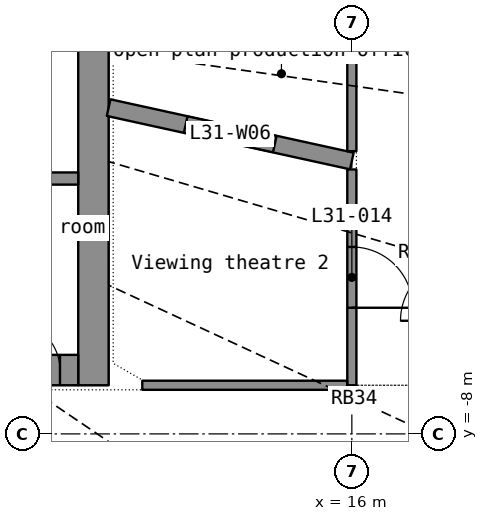
"""IFC4 building model, lengths in metres.
Left out: names, types, materials, properties, quantities, classifications, styles, units other than length and angle.
Written with IfcOpenShell. Run it as: python <this file> out.ifc"""

import sys

from ifc_helpers import new_model, si_unit, direction, frame, frame_2d, origin, place, context, subcontext, project, spatial, rectangle, extrude, element, fill, save


model = new_model("IFC4")
c1 = context("Model", 3, precision=1e-05, world=origin(), true_north=direction((0.0, 1.0)))
c2 = subcontext(c1, "Body", "Model", "MODEL_VIEW")
j1 = project(units=[si_unit("LENGTHUNIT", "METRE"), si_unit("PLANEANGLEUNIT", "RADIAN")], contexts=[c1])
p1 = place(None, origin())
s1 = spatial("IfcSite", under=j1, at=p1, CompositionType="ELEMENT")
p2 = place(p1, origin())
s2 = spatial("IfcBuilding", under=s1, at=p2, CompositionType="ELEMENT")
p3 = place(p2, frame((0.0, 0.0, 130.4)))
s3 = spatial("IfcBuildingStorey", under=s2, at=p3, CompositionType="ELEMENT", Elevation=130.4)
p4 = place(p3, frame((11.75, -7.2, 0.0), z_axis=(0.0, 0.0, 1.0), x_axis=(0.0, 1.0, 0.0)))
e1 = element("IfcWall", 1, at=p4, inside=s3, PredefinedType="SHEAR", context=c2, shape_type="SweptSolid", body=[
    extrude(rectangle(XDim=14.4, YDim=0.5, at=frame_2d((7.2, 0.0))), origin(), (0.0, 0.0, 1.0), 3.3),
])
p5 = place(p4, frame((6.5, 0.0, 0.0)))
e2 = element("IfcOpeningElement", 2, at=p5, cuts=e1, PredefinedType="OPENING", context=c2, shape_type="SweptSolid", body=[
    extrude(rectangle(XDim=1.4, YDim=2.2, at=frame_2d((0.7, 1.1))), frame((0.0, 0.26, 0.0), z_axis=(0.0, -1.0, 0.0), x_axis=(1.0, 0.0, 0.0)), (0.0, 0.0, 1.0), 0.52),
])
p6 = place(p3, frame((-11.5, -6.95, 0.0), z_axis=(0.0, 0.0, 1.0), x_axis=(1.0, 0.0, 0.0)))
e3 = element("IfcWall", 3, at=p6, inside=s3, PredefinedType="SHEAR", context=c2, shape_type="SweptSolid", body=[
    extrude(rectangle(XDim=23.0, YDim=0.5, at=frame_2d((11.5, 0.0))), origin(), (0.0, 0.0, 1.0), 3.3),
])
p7 = place(p6, frame((1.95, 0.0, 0.0)))
e4 = element("IfcOpeningElement", 4, at=p7, cuts=e3, PredefinedType="OPENING", context=c2, shape_type="SweptSolid", body=[
    extrude(rectangle(XDim=1.1, YDim=2.2, at=frame_2d((0.55, 1.1))), frame((0.0, 0.26, 0.0), z_axis=(0.0, -1.0, 0.0), x_axis=(1.0, 0.0, 0.0)), (0.0, 0.0, 1.0), 0.52),
])
p8 = place(p6, frame((3.95, 0.0, 0.0)))
e5 = element("IfcOpeningElement", 5, at=p8, cuts=e3, PredefinedType="OPENING", context=c2, shape_type="SweptSolid", body=[
    extrude(rectangle(XDim=1.1, YDim=2.2, at=frame_2d((0.55, 1.1))), frame((0.0, 0.26, 0.0), z_axis=(0.0, -1.0, 0.0), x_axis=(1.0, 0.0, 0.0)), (0.0, 0.0, 1.0), 0.52),
])
p9 = place(p6, frame((5.95, 0.0, 0.0)))
e6 = element("IfcOpeningElement", 6, at=p9, cuts=e3, PredefinedType="OPENING", context=c2, shape_type="SweptSolid", body=[
    extrude(rectangle(XDim=1.1, YDim=2.2, at=frame_2d((0.55, 1.1))), frame((0.0, 0.26, 0.0), z_axis=(0.0, -1.0, 0.0), x_axis=(1.0, 0.0, 0.0)), (0.0, 0.0, 1.0), 0.52),
])
p10 = place(p6, frame((7.95, 0.0, 0.0)))
e7 = element("IfcOpeningElement", 7, at=p10, cuts=e3, PredefinedType="OPENING", context=c2, shape_type="SweptSolid", body=[
    extrude(rectangle(XDim=1.1, YDim=2.2, at=frame_2d((0.55, 1.1))), frame((0.0, 0.26, 0.0), z_axis=(0.0, -1.0, 0.0), x_axis=(1.0, 0.0, 0.0)), (0.0, 0.0, 1.0), 0.52),
])
p11 = place(p6, frame((9.95, 0.0, 0.0)))
e8 = element("IfcOpeningElement", 8, at=p11, cuts=e3, PredefinedType="OPENING", context=c2, shape_type="SweptSolid", body=[
    extrude(rectangle(XDim=1.1, YDim=2.2, at=frame_2d((0.55, 1.1))), frame((0.0, 0.26, 0.0), z_axis=(0.0, -1.0, 0.0), x_axis=(1.0, 0.0, 0.0)), (0.0, 0.0, 1.0), 0.52),
])
p12 = place(p6, frame((11.95, 0.0, 0.0)))
e9 = element("IfcOpeningElement", 9, at=p12, cuts=e3, PredefinedType="OPENING", context=c2, shape_type="SweptSolid", body=[
    extrude(rectangle(XDim=1.1, YDim=2.2, at=frame_2d((0.55, 1.1))), frame((0.0, 0.26, 0.0), z_axis=(0.0, -1.0, 0.0), x_axis=(1.0, 0.0, 0.0)), (0.0, 0.0, 1.0), 0.52),
])
p13 = place(p6, frame((13.95, 0.0, 0.0)))
e10 = element("IfcOpeningElement", 10, at=p13, cuts=e3, PredefinedType="OPENING", context=c2, shape_type="SweptSolid", body=[
    extrude(rectangle(XDim=1.1, YDim=2.2, at=frame_2d((0.55, 1.1))), frame((0.0, 0.26, 0.0), z_axis=(0.0, -1.0, 0.0), x_axis=(1.0, 0.0, 0.0)), (0.0, 0.0, 1.0), 0.52),
])
p14 = place(p6, frame((15.95, 0.0, 0.0)))
e11 = element("IfcOpeningElement", 11, at=p14, cuts=e3, PredefinedType="OPENING", context=c2, shape_type="SweptSolid", body=[
    extrude(rectangle(XDim=1.1, YDim=2.2, at=frame_2d((0.55, 1.1))), frame((0.0, 0.26, 0.0), z_axis=(0.0, -1.0, 0.0), x_axis=(1.0, 0.0, 0.0)), (0.0, 0.0, 1.0), 0.52),
])
p15 = place(p6, frame((19.95, 0.0, 0.0)))
e12 = element("IfcOpeningElement", 12, at=p15, cuts=e3, PredefinedType="OPENING", context=c2, shape_type="SweptSolid", body=[
    extrude(rectangle(XDim=1.1, YDim=2.2, at=frame_2d((0.55, 1.1))), frame((0.0, 0.26, 0.0), z_axis=(0.0, -1.0, 0.0), x_axis=(1.0, 0.0, 0.0)), (0.0, 0.0, 1.0), 0.52),
])
p16 = place(p6, frame((0.3, 0.0, 0.0)))
e13 = element("IfcOpeningElement", 13, at=p16, cuts=e3, PredefinedType="OPENING", context=c2, shape_type="SweptSolid", body=[
    extrude(rectangle(XDim=0.8, YDim=2.05, at=frame_2d((0.4, 1.025))), frame((0.0, 0.26, 0.0), z_axis=(0.0, -1.0, 0.0), x_axis=(1.0, 0.0, 0.0)), (0.0, 0.0, 1.0), 0.52),
])
p17 = place(p6, frame((21.9, 0.0, 0.0)))
e14 = element("IfcOpeningElement", 14, at=p17, cuts=e3, PredefinedType="OPENING", context=c2, shape_type="SweptSolid", body=[
    extrude(rectangle(XDim=0.8, YDim=2.05, at=frame_2d((0.4, 1.025))), frame((0.0, 0.26, 0.0), z_axis=(0.0, -1.0, 0.0), x_axis=(1.0, 0.0, 0.0)), (0.0, 0.0, 1.0), 0.52),
])
p18 = place(p3, frame((-11.5, -3.8, 0.0), z_axis=(0.0, 0.0, 1.0), x_axis=(1.0, 0.0, 0.0)))
e15 = element("IfcWall", 15, at=p18, inside=s3, PredefinedType="SHEAR", context=c2, shape_type="SweptSolid", body=[
    extrude(rectangle(XDim=23.0, YDim=0.2, at=frame_2d((11.5, 0.0))), origin(), (0.0, 0.0, 1.0), 3.3),
])
p19 = place(p3, frame((16.0, -3.512, 0.0), z_axis=(0.0, 0.0, 1.0), x_axis=(-0.976750433, 0.214379551, 0.0)))
e16 = element("IfcWall", 16, at=p19, inside=s3, PredefinedType="PARTITIONING", context=c2, shape_type="SweptSolid", body=[
    extrude(rectangle(XDim=4.095, YDim=0.28, at=frame_2d((2.048, 0.0))), origin(), (0.0, 0.0, 1.0), 2.4),
])
p20 = place(p19, frame((1.298, 0.0, 1.0)))
e17 = element("IfcOpeningElement", 17, at=p20, cuts=e16, PredefinedType="OPENING", context=c2, shape_type="SweptSolid", body=[
    extrude(rectangle(XDim=1.5, YDim=1.2, at=frame_2d((0.75, 0.6))), frame((0.0, 0.15, 0.0), z_axis=(0.0, -1.0, 0.0), x_axis=(1.0, 0.0, 0.0)), (0.0, 0.0, 1.0), 0.3),
])
p21 = place(p3, frame((16.0, -3.65, 0.0), z_axis=(0.0, 0.0, 1.0), x_axis=(0.0, -1.0, 0.0)))
e18 = element("IfcWall", 18, at=p21, inside=s3, PredefinedType="PARTITIONING", context=c2, shape_type="SweptSolid", body=[
    extrude(rectangle(XDim=3.55, YDim=0.15, at=frame_2d((1.775, 0.0))), origin(), (0.0, 0.0, 1.0), 2.4),
])
p22 = place(p21, frame((1.275, 0.0, 0.0)))
e19 = element("IfcOpeningElement", 19, at=p22, cuts=e18, PredefinedType="OPENING", context=c2, shape_type="SweptSolid", body=[
    extrude(rectangle(XDim=1.0, YDim=2.2, at=frame_2d((0.5, 1.1))), frame((0.0, 0.085, 0.0), z_axis=(0.0, -1.0, 0.0), x_axis=(1.0, 0.0, 0.0)), (0.0, 0.0, 1.0), 0.17),
])
p23 = place(p3, frame((15.923, -7.2, 0.0), z_axis=(0.0, 0.0, 1.0), x_axis=(-1.0, 0.0, 0.0)))
e20 = element("IfcWall", 20, at=p23, inside=s3, PredefinedType="PARTITIONING", context=c2, shape_type="SweptSolid", body=[
    extrude(rectangle(XDim=3.37, YDim=0.15, at=frame_2d((1.685, 0.0))), origin(), (0.0, 0.0, 1.0), 2.4),
])
p24 = place(p3, frame((16.0, -0.977, 0.0), z_axis=(0.0, 0.0, 1.0), x_axis=(0.0, -1.0, 0.0)))
e21 = element("IfcWall", 21, at=p24, inside=s3, PredefinedType="PARTITIONING", context=c2, shape_type="SweptSolid", body=[
    extrude(rectangle(XDim=2.373, YDim=0.15, at=frame_2d((1.187, 0.0))), origin(), (0.0, 0.0, 1.0), 2.4),
])
p25 = place(p17, origin())
e22 = element("IfcDoor", 22, at=p25, inside=s3, OperationType="SINGLE_SWING_LEFT", PredefinedType="DOOR", context=c2, shape_type="SweptSolid", body=[
    extrude(rectangle(XDim=0.8, YDim=2.05, at=frame_2d((0.4, 1.025))), frame((0.0, 0.025, 0.0), z_axis=(0.0, -1.0, 0.0), x_axis=(1.0, 0.0, 0.0)), (0.0, 0.0, 1.0), 0.05),
])
fill(e14, e22)
p26 = place(p22, origin())
e23 = element("IfcDoor", 23, at=p26, inside=s3, OperationType="SINGLE_SWING_RIGHT", PredefinedType="DOOR", context=c2, shape_type="SweptSolid", body=[
    extrude(rectangle(XDim=1.0, YDim=2.2, at=frame_2d((0.5, 1.1))), frame((0.0, 0.025, 0.0), z_axis=(0.0, -1.0, 0.0), x_axis=(1.0, 0.0, 0.0)), (0.0, 0.0, 1.0), 0.05),
])
fill(e19, e23)
p27 = place(p20, origin())
e24 = element("IfcWindow", 24, at=p27, inside=s3, PartitioningType="SINGLE_PANEL", PredefinedType="WINDOW", context=c2, shape_type="SweptSolid", body=[
    extrude(rectangle(XDim=1.5, YDim=1.2, at=frame_2d((0.75, 0.6))), frame((0.0, 0.03, 0.0), z_axis=(0.0, -1.0, 0.0), x_axis=(1.0, 0.0, 0.0)), (0.0, 0.0, 1.0), 0.06),
])
fill(e17, e24)
save(model, sys.argv[1])
